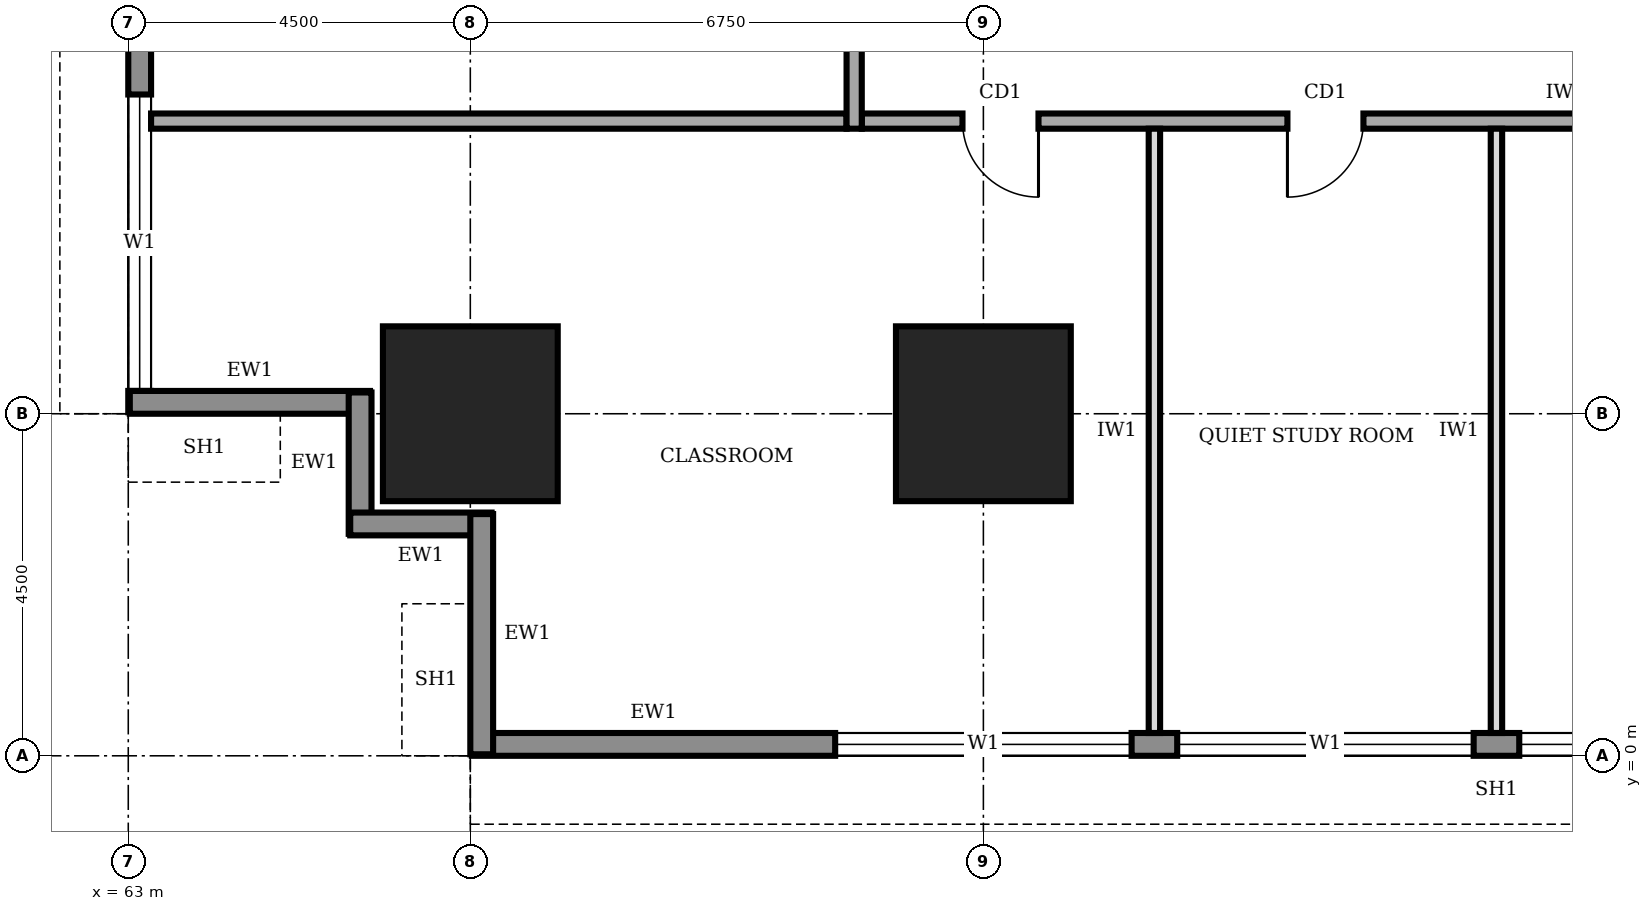
"""IFC4 building model, lengths in metres.
Left out: names, types, materials, properties, quantities, classifications, styles, units other than length and angle.
Written with IfcOpenShell. Run it as: python <this file> out.ifc"""

import sys

from ifc_helpers import new_model, si_unit, direction, frame, frame_2d, origin, origin_2d, place, context, subcontext, project, spatial, rectangle, extrude, element, fill, save


model = new_model("IFC4")
c1 = context("Model", 3, precision=1e-05, world=origin(), true_north=direction((0.0, 1.0)))
c2 = subcontext(c1, "Body", "Model", "MODEL_VIEW")
j1 = project(units=[si_unit("LENGTHUNIT", "METRE"), si_unit("PLANEANGLEUNIT", "RADIAN")], contexts=[c1])
p1 = place(None, origin())
s1 = spatial("IfcSite", under=j1, at=p1, CompositionType="ELEMENT")
p2 = place(p1, origin())
s2 = spatial("IfcBuilding", under=s1, at=p2, CompositionType="ELEMENT")
p3 = place(p2, frame((0.0, 0.0, 41.0)))
s3 = spatial("IfcBuildingStorey", under=s2, at=p3, CompositionType="ELEMENT", Elevation=41.0)
for number, where, z_axis, x_axis in (
    (1, (67.5, 4.5, 0.0), (0.0, 0.0, 1.0), (1.0, 0.0, 0.0)),
    (2, (74.25, 4.5, 0.0), (0.0, 0.0, 1.0), (1.0, 0.0, 0.0)),
):
    element("IfcColumn", number, at=place(p3, frame(where, z_axis=z_axis, x_axis=x_axis)), inside=s3, PredefinedType="COLUMN", context=c2, shape_type="SweptSolid", body=[
        extrude(rectangle(XDim=2.3, YDim=2.3, at=origin_2d()), origin(), (0.0, 0.0, 1.0), 4.0),
    ])
p4 = place(p3, frame((67.52, 0.15, 0.0), z_axis=(0.0, 0.0, 1.0), x_axis=(1.0, 0.0, 0.0)))
e3 = element("IfcWall", 3, at=p4, inside=s3, PredefinedType="STANDARD", context=c2, shape_type="SweptSolid", body=[
    extrude(rectangle(XDim=26.96, YDim=0.3, at=frame_2d((13.48, 0.0))), origin(), (0.0, 0.0, 1.0), 3.75),
])
p5 = place(p4, frame((4.78, 0.0, 0.9)))
e4 = element("IfcOpeningElement", 4, at=p5, cuts=e3, PredefinedType="OPENING", context=c2, shape_type="SweptSolid", body=[
    extrude(rectangle(XDim=3.9, YDim=2.2, at=frame_2d((1.95, 1.1))), frame((0.0, 0.16, 0.0), z_axis=(0.0, -1.0, 0.0), x_axis=(1.0, 0.0, 0.0)), (0.0, 0.0, 1.0), 0.32),
])
p6 = place(p4, frame((9.28, 0.0, 0.9)))
e5 = element("IfcOpeningElement", 5, at=p6, cuts=e3, PredefinedType="OPENING", context=c2, shape_type="SweptSolid", body=[
    extrude(rectangle(XDim=3.9, YDim=2.2, at=frame_2d((1.95, 1.1))), frame((0.0, 0.16, 0.0), z_axis=(0.0, -1.0, 0.0), x_axis=(1.0, 0.0, 0.0)), (0.0, 0.0, 1.0), 0.32),
])
p7 = place(p4, frame((13.78, 0.0, 0.9)))
e6 = element("IfcOpeningElement", 6, at=p7, cuts=e3, PredefinedType="OPENING", context=c2, shape_type="SweptSolid", body=[
    extrude(rectangle(XDim=3.9, YDim=2.2, at=frame_2d((1.95, 1.1))), frame((0.0, 0.16, 0.0), z_axis=(0.0, -1.0, 0.0), x_axis=(1.0, 0.0, 0.0)), (0.0, 0.0, 1.0), 0.32),
])
p8 = place(p4, frame((18.28, 0.0, 0.9)))
e7 = element("IfcOpeningElement", 7, at=p8, cuts=e3, PredefinedType="OPENING", context=c2, shape_type="SweptSolid", body=[
    extrude(rectangle(XDim=3.9, YDim=2.2, at=frame_2d((1.95, 1.1))), frame((0.0, 0.16, 0.0), z_axis=(0.0, -1.0, 0.0), x_axis=(1.0, 0.0, 0.0)), (0.0, 0.0, 1.0), 0.32),
])
p9 = place(p4, frame((22.78, 0.0, 0.9)))
e8 = element("IfcOpeningElement", 8, at=p9, cuts=e3, PredefinedType="OPENING", context=c2, shape_type="SweptSolid", body=[
    extrude(rectangle(XDim=3.9, YDim=2.2, at=frame_2d((1.95, 1.1))), frame((0.0, 0.16, 0.0), z_axis=(0.0, -1.0, 0.0), x_axis=(1.0, 0.0, 0.0)), (0.0, 0.0, 1.0), 0.32),
])
p10 = place(p3, frame((63.15, 35.98, 0.0), z_axis=(0.0, 0.0, 1.0), x_axis=(0.0, -1.0, 0.0)))
e9 = element("IfcWall", 9, at=p10, inside=s3, PredefinedType="STANDARD", context=c2, shape_type="SweptSolid", body=[
    extrude(rectangle(XDim=31.46, YDim=0.3, at=frame_2d((15.73, 0.0))), origin(), (0.0, 0.0, 1.0), 3.75),
])
p11 = place(p10, frame((27.28, 0.0, 0.9)))
e10 = element("IfcOpeningElement", 10, at=p11, cuts=e9, PredefinedType="OPENING", context=c2, shape_type="SweptSolid", body=[
    extrude(rectangle(XDim=3.9, YDim=2.2, at=frame_2d((1.95, 1.1))), frame((0.0, 0.16, 0.0), z_axis=(0.0, -1.0, 0.0), x_axis=(1.0, 0.0, 0.0)), (0.0, 0.0, 1.0), 0.32),
])
p12 = place(p10, frame((22.78, 0.0, 0.9)))
e11 = element("IfcOpeningElement", 11, at=p12, cuts=e9, PredefinedType="OPENING", context=c2, shape_type="SweptSolid", body=[
    extrude(rectangle(XDim=3.9, YDim=2.2, at=frame_2d((1.95, 1.1))), frame((0.0, 0.16, 0.0), z_axis=(0.0, -1.0, 0.0), x_axis=(1.0, 0.0, 0.0)), (0.0, 0.0, 1.0), 0.32),
])
p13 = place(p10, frame((18.28, 0.0, 0.9)))
e12 = element("IfcOpeningElement", 12, at=p13, cuts=e9, PredefinedType="OPENING", context=c2, shape_type="SweptSolid", body=[
    extrude(rectangle(XDim=3.9, YDim=2.2, at=frame_2d((1.95, 1.1))), frame((0.0, 0.16, 0.0), z_axis=(0.0, -1.0, 0.0), x_axis=(1.0, 0.0, 0.0)), (0.0, 0.0, 1.0), 0.32),
])
p14 = place(p10, frame((13.78, 0.0, 0.9)))
e13 = element("IfcOpeningElement", 13, at=p14, cuts=e9, PredefinedType="OPENING", context=c2, shape_type="SweptSolid", body=[
    extrude(rectangle(XDim=3.9, YDim=2.2, at=frame_2d((1.95, 1.1))), frame((0.0, 0.16, 0.0), z_axis=(0.0, -1.0, 0.0), x_axis=(1.0, 0.0, 0.0)), (0.0, 0.0, 1.0), 0.32),
])
p15 = place(p10, frame((9.28, 0.0, 0.9)))
e14 = element("IfcOpeningElement", 14, at=p15, cuts=e9, PredefinedType="OPENING", context=c2, shape_type="SweptSolid", body=[
    extrude(rectangle(XDim=3.9, YDim=2.2, at=frame_2d((1.95, 1.1))), frame((0.0, 0.16, 0.0), z_axis=(0.0, -1.0, 0.0), x_axis=(1.0, 0.0, 0.0)), (0.0, 0.0, 1.0), 0.32),
])
p16 = place(p10, frame((4.78, 0.0, 0.9)))
e15 = element("IfcOpeningElement", 15, at=p16, cuts=e9, PredefinedType="OPENING", context=c2, shape_type="SweptSolid", body=[
    extrude(rectangle(XDim=3.9, YDim=2.2, at=frame_2d((1.95, 1.1))), frame((0.0, 0.16, 0.0), z_axis=(0.0, -1.0, 0.0), x_axis=(1.0, 0.0, 0.0)), (0.0, 0.0, 1.0), 0.32),
])
p17 = place(p3, frame((63.02, 4.65, 0.0), z_axis=(0.0, 0.0, 1.0), x_axis=(1.0, 0.0, 0.0)))
e16 = element("IfcWall", 16, at=p17, inside=s3, PredefinedType="STANDARD", context=c2, shape_type="SweptSolid", body=[
    extrude(rectangle(XDim=3.16, YDim=0.3, at=frame_2d((1.58, 0.0))), origin(), (0.0, 0.0, 1.0), 2.85),
])
for number, where, z_axis, x_axis in (
    (17, (66.05, 4.78, 0.0), (0.0, 0.0, 1.0), (0.0, -1.0, 0.0)),
    (18, (65.92, 3.05, 0.0), (0.0, 0.0, 1.0), (1.0, 0.0, 0.0)),
):
    element("IfcWall", number, at=place(p3, frame(where, z_axis=z_axis, x_axis=x_axis)), inside=s3, PredefinedType="STANDARD", context=c2, shape_type="SweptSolid", body=[
        extrude(rectangle(XDim=1.86, YDim=0.3, at=frame_2d((0.93, 0.0))), origin(), (0.0, 0.0, 1.0), 3.75),
    ])
p18 = place(p3, frame((67.65, 3.18, 0.0), z_axis=(0.0, 0.0, 1.0), x_axis=(0.0, -1.0, 0.0)))
e19 = element("IfcWall", 19, at=p18, inside=s3, PredefinedType="STANDARD", context=c2, shape_type="SweptSolid", body=[
    extrude(rectangle(XDim=3.16, YDim=0.3, at=frame_2d((1.58, 0.0))), origin(), (0.0, 0.0, 1.0), 2.85),
])
p19 = place(p3, frame((72.65, 8.35, 0.0), z_axis=(0.0, 0.0, 1.0), x_axis=(1.0, 0.0, 0.0)))
e20 = element("IfcWall", 20, at=p19, inside=s3, PredefinedType="SOLIDWALL", context=c2, shape_type="SweptSolid", body=[
    extrude(rectangle(XDim=16.9, YDim=0.2, at=frame_2d((8.45, 0.0))), origin(), (0.0, 0.0, 1.0), 3.75),
])
p20 = place(p19, frame((1.325, 0.0, 0.0)))
e21 = element("IfcOpeningElement", 21, at=p20, cuts=e20, PredefinedType="OPENING", context=c2, shape_type="SweptSolid", body=[
    extrude(rectangle(XDim=1.0, YDim=2.1, at=frame_2d((0.5, 1.05))), frame((0.0, 0.11, 0.0), z_axis=(0.0, -1.0, 0.0), x_axis=(1.0, 0.0, 0.0)), (0.0, 0.0, 1.0), 0.22),
])
p21 = place(p19, frame((5.6, 0.0, 0.0)))
e22 = element("IfcOpeningElement", 22, at=p21, cuts=e20, PredefinedType="OPENING", context=c2, shape_type="SweptSolid", body=[
    extrude(rectangle(XDim=1.0, YDim=2.1, at=frame_2d((0.5, 1.05))), frame((0.0, 0.11, 0.0), z_axis=(0.0, -1.0, 0.0), x_axis=(1.0, 0.0, 0.0)), (0.0, 0.0, 1.0), 0.22),
])
p22 = place(p19, frame((11.925, 0.0, 0.0)))
e23 = element("IfcOpeningElement", 23, at=p22, cuts=e20, PredefinedType="OPENING", context=c2, shape_type="SweptSolid", body=[
    extrude(rectangle(XDim=1.4, YDim=2.1, at=frame_2d((0.7, 1.05))), frame((0.0, 0.11, 0.0), z_axis=(0.0, -1.0, 0.0), x_axis=(1.0, 0.0, 0.0)), (0.0, 0.0, 1.0), 0.22),
])
p23 = place(p3, frame((72.55, 32.05, 0.0), z_axis=(0.0, 0.0, 1.0), x_axis=(0.0, -1.0, 0.0)))
e24 = element("IfcWall", 24, at=p23, inside=s3, PredefinedType="SOLIDWALL", context=c2, shape_type="SweptSolid", body=[
    extrude(rectangle(XDim=23.8, YDim=0.2, at=frame_2d((11.9, 0.0))), origin(), (0.0, 0.0, 1.0), 3.75),
])
p24 = place(p23, frame((18.425, 0.0, 0.0)))
e25 = element("IfcOpeningElement", 25, at=p24, cuts=e24, PredefinedType="OPENING", context=c2, shape_type="SweptSolid", body=[
    extrude(rectangle(XDim=1.0, YDim=2.1, at=frame_2d((0.5, 1.05))), frame((0.0, 0.11, 0.0), z_axis=(0.0, -1.0, 0.0), x_axis=(1.0, 0.0, 0.0)), (0.0, 0.0, 1.0), 0.22),
])
p25 = place(p23, frame((6.225, 0.0, 0.0)))
e26 = element("IfcOpeningElement", 26, at=p25, cuts=e24, PredefinedType="OPENING", context=c2, shape_type="SweptSolid", body=[
    extrude(rectangle(XDim=1.4, YDim=2.1, at=frame_2d((0.7, 1.05))), frame((0.0, 0.11, 0.0), z_axis=(0.0, -1.0, 0.0), x_axis=(1.0, 0.0, 0.0)), (0.0, 0.0, 1.0), 0.22),
])
p26 = place(p3, frame((63.3, 8.35, 0.0), z_axis=(0.0, 0.0, 1.0), x_axis=(1.0, 0.0, 0.0)))
e27 = element("IfcWall", 27, at=p26, inside=s3, PredefinedType="SOLIDWALL", context=c2, shape_type="SweptSolid", body=[
    extrude(rectangle(XDim=9.15, YDim=0.2, at=frame_2d((4.575, 0.0))), origin(), (0.0, 0.0, 1.0), 3.75),
])
for number, where, z_axis, x_axis in (
    (28, (76.5, 0.3, 0.0), (0.0, 0.0, 1.0), (0.0, 1.0, 0.0)),
    (29, (81.0, 0.3, 0.0), (0.0, 0.0, 1.0), (0.0, 1.0, 0.0)),
):
    element("IfcWall", number, at=place(p3, frame(where, z_axis=z_axis, x_axis=x_axis)), inside=s3, PredefinedType="PARTITIONING", context=c2, shape_type="SweptSolid", body=[
        extrude(rectangle(XDim=7.95, YDim=0.15, at=frame_2d((3.975, 0.0))), origin(), (0.0, 0.0, 1.0), 3.75),
    ])
p27 = place(p5, origin())
e30 = element("IfcWindow", 30, at=p27, inside=s3, PartitioningType="SINGLE_PANEL", PredefinedType="WINDOW", context=c2, shape_type="SweptSolid", body=[
    extrude(rectangle(XDim=3.9, YDim=2.2, at=frame_2d((1.95, 1.1))), frame((0.0, 0.03, 0.0), z_axis=(0.0, -1.0, 0.0), x_axis=(1.0, 0.0, 0.0)), (0.0, 0.0, 1.0), 0.06),
])
fill(e4, e30)
p28 = place(p6, origin())
e31 = element("IfcWindow", 31, at=p28, inside=s3, PartitioningType="SINGLE_PANEL", PredefinedType="WINDOW", context=c2, shape_type="SweptSolid", body=[
    extrude(rectangle(XDim=3.9, YDim=2.2, at=frame_2d((1.95, 1.1))), frame((0.0, 0.03, 0.0), z_axis=(0.0, -1.0, 0.0), x_axis=(1.0, 0.0, 0.0)), (0.0, 0.0, 1.0), 0.06),
])
fill(e5, e31)
p29 = place(p7, origin())
e32 = element("IfcWindow", 32, at=p29, inside=s3, PartitioningType="SINGLE_PANEL", PredefinedType="WINDOW", context=c2, shape_type="SweptSolid", body=[
    extrude(rectangle(XDim=3.9, YDim=2.2, at=frame_2d((1.95, 1.1))), frame((0.0, 0.03, 0.0), z_axis=(0.0, -1.0, 0.0), x_axis=(1.0, 0.0, 0.0)), (0.0, 0.0, 1.0), 0.06),
])
fill(e6, e32)
p30 = place(p11, origin())
e33 = element("IfcWindow", 33, at=p30, inside=s3, PartitioningType="SINGLE_PANEL", PredefinedType="WINDOW", context=c2, shape_type="SweptSolid", body=[
    extrude(rectangle(XDim=3.9, YDim=2.2, at=frame_2d((1.95, 1.1))), frame((0.0, 0.03, 0.0), z_axis=(0.0, -1.0, 0.0), x_axis=(1.0, 0.0, 0.0)), (0.0, 0.0, 1.0), 0.06),
])
fill(e10, e33)
p31 = place(p20, frame((1.0, 0.0, 0.0), z_axis=(0.0, 0.0, 1.0), x_axis=(-1.0, 0.0, 0.0)))
e34 = element("IfcDoor", 34, at=p31, inside=s3, OperationType="SINGLE_SWING_LEFT", PredefinedType="DOOR", context=c2, shape_type="SweptSolid", body=[
    extrude(rectangle(XDim=1.0, YDim=2.1, at=frame_2d((0.5, 1.05))), frame((0.0, 0.025, 0.0), z_axis=(0.0, -1.0, 0.0), x_axis=(1.0, 0.0, 0.0)), (0.0, 0.0, 1.0), 0.05),
])
fill(e21, e34)
p32 = place(p21, frame((1.0, 0.0, 0.0), z_axis=(0.0, 0.0, 1.0), x_axis=(-1.0, 0.0, 0.0)))
e35 = element("IfcDoor", 35, at=p32, inside=s3, OperationType="SINGLE_SWING_RIGHT", PredefinedType="DOOR", context=c2, shape_type="SweptSolid", body=[
    extrude(rectangle(XDim=1.0, YDim=2.1, at=frame_2d((0.5, 1.05))), frame((0.0, 0.025, 0.0), z_axis=(0.0, -1.0, 0.0), x_axis=(1.0, 0.0, 0.0)), (0.0, 0.0, 1.0), 0.05),
])
fill(e22, e35)
save(model, sys.argv[1])
